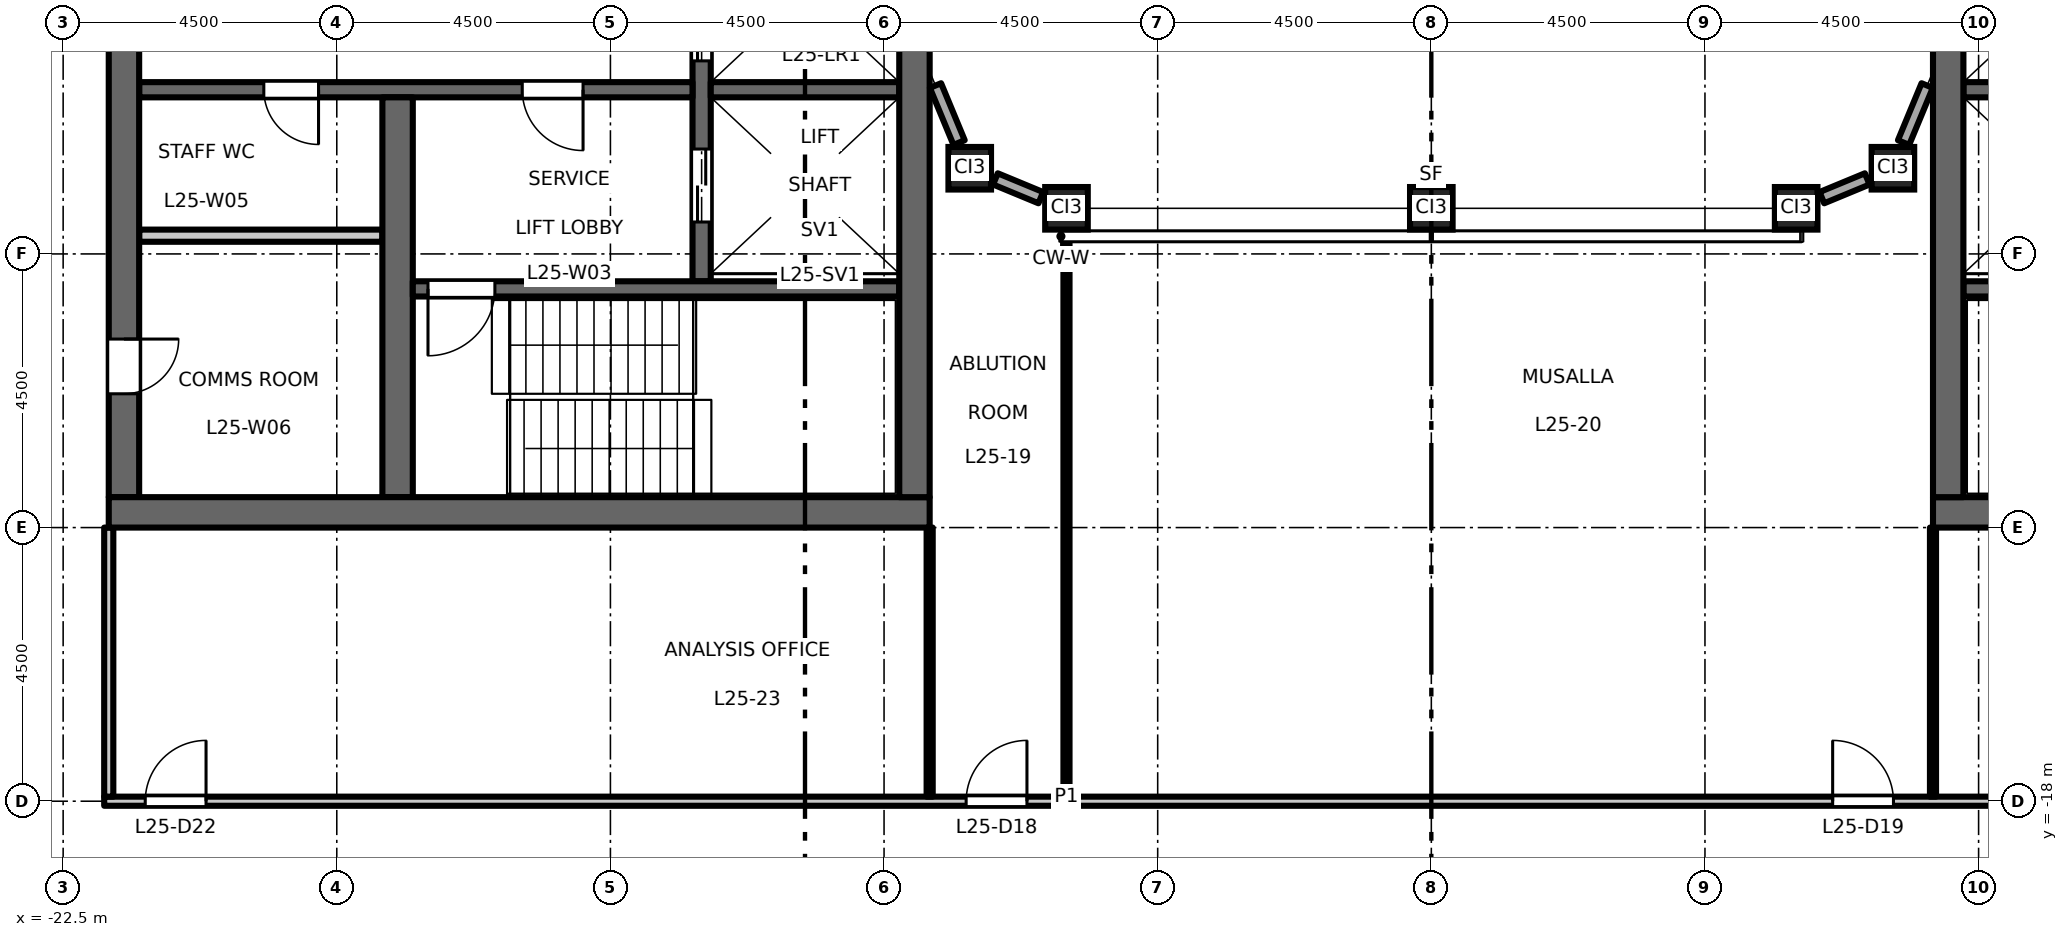
"""IFC4 building model, lengths in metres.
Left out: names, types, materials, properties, quantities, classifications, styles, units other than length and angle.
Written with IfcOpenShell. Run it as: python <this file> out.ifc"""

import sys

from ifc_helpers import new_model, si_unit, direction, frame, frame_2d, origin, origin_2d, place, context, subcontext, project, spatial, rectangle, hollow_rectangle, extrude, element, fill, save


model = new_model("IFC4")
c1 = context("Model", 3, precision=1e-05, world=origin(), true_north=direction((0.0, 1.0)))
c2 = subcontext(c1, "Body", "Model", "MODEL_VIEW")
j1 = project(units=[si_unit("LENGTHUNIT", "METRE"), si_unit("PLANEANGLEUNIT", "RADIAN")], contexts=[c1])
p1 = place(None, origin())
s1 = spatial("IfcSite", under=j1, at=p1, CompositionType="ELEMENT")
p2 = place(p1, origin())
s2 = spatial("IfcBuilding", under=s1, at=p2, CompositionType="ELEMENT")
p3 = place(p2, frame((0.0, 0.0, 118.2)))
s3 = spatial("IfcBuildingStorey", under=s2, at=p3, CompositionType="ELEMENT", Elevation=118.2)
for number, where, z_axis, x_axis in (
    (1, (-7.591, -7.591, 0.0), (0.0, 0.0, 1.0), (1.0, 0.0, 0.0)),
    (2, (-6.0, -8.25, 0.0), (0.0, 0.0, 1.0), (1.0, 0.0, 0.0)),
    (3, (0.0, -8.25, 0.0), (0.0, 0.0, 1.0), (1.0, 0.0, 0.0)),
    (4, (6.0, -8.25, 0.0), (0.0, 0.0, 1.0), (1.0, 0.0, 0.0)),
    (5, (7.591, -7.591, 0.0), (0.0, 0.0, 1.0), (1.0, 0.0, 0.0)),
):
    element("IfcColumn", number, at=place(p3, frame(where, z_axis=z_axis, x_axis=x_axis)), inside=s3, PredefinedType="COLUMN", context=c2, shape_type="SweptSolid", body=[
        extrude(hollow_rectangle(XDim=0.7, YDim=0.7, WallThickness=0.04, at=origin_2d()), origin(), (0.0, 0.0, 1.0), 4.5),
    ])
p4 = place(p3, frame((-12.0, -9.45, 0.0), z_axis=(0.0, 0.0, 1.0), x_axis=(0.0, 1.0, 0.0)))
e6 = element("IfcWall", 6, at=p4, inside=s3, PredefinedType="SHEAR", context=c2, shape_type="SweptSolid", body=[
    extrude(rectangle(XDim=18.9, YDim=0.3, at=frame_2d((9.45, 0.0))), origin(), (0.0, 0.0, 1.0), 4.35),
])
p5 = place(p4, frame((3.625, 0.0, 0.0)))
e7 = element("IfcOpeningElement", 7, at=p5, cuts=e6, PredefinedType="OPENING", context=c2, shape_type="SweptSolid", body=[
    extrude(rectangle(XDim=1.1, YDim=2.1, at=frame_2d((0.55, 1.05))), frame((0.0, 0.16, 0.0), z_axis=(0.0, -1.0, 0.0), x_axis=(1.0, 0.0, 0.0)), (0.0, 0.0, 1.0), 0.32),
])
p6 = place(p4, frame((6.775, 0.0, 0.0)))
e8 = element("IfcOpeningElement", 8, at=p6, cuts=e6, PredefinedType="OPENING", context=c2, shape_type="SweptSolid", body=[
    extrude(rectangle(XDim=1.1, YDim=2.1, at=frame_2d((0.55, 1.05))), frame((0.0, 0.16, 0.0), z_axis=(0.0, -1.0, 0.0), x_axis=(1.0, 0.0, 0.0)), (0.0, 0.0, 1.0), 0.32),
])
p7 = place(p4, frame((9.925, 0.0, 0.0)))
e9 = element("IfcOpeningElement", 9, at=p7, cuts=e6, PredefinedType="OPENING", context=c2, shape_type="SweptSolid", body=[
    extrude(rectangle(XDim=1.1, YDim=2.1, at=frame_2d((0.55, 1.05))), frame((0.0, 0.16, 0.0), z_axis=(0.0, -1.0, 0.0), x_axis=(1.0, 0.0, 0.0)), (0.0, 0.0, 1.0), 0.32),
])
p8 = place(p4, frame((13.075, 0.0, 0.0)))
e10 = element("IfcOpeningElement", 10, at=p8, cuts=e6, PredefinedType="OPENING", context=c2, shape_type="SweptSolid", body=[
    extrude(rectangle(XDim=1.1, YDim=2.1, at=frame_2d((0.55, 1.05))), frame((0.0, 0.16, 0.0), z_axis=(0.0, -1.0, 0.0), x_axis=(1.0, 0.0, 0.0)), (0.0, 0.0, 1.0), 0.32),
])
p9 = place(p4, frame((16.725, 0.0, 0.0)))
e11 = element("IfcOpeningElement", 11, at=p9, cuts=e6, PredefinedType="OPENING", context=c2, shape_type="SweptSolid", body=[
    extrude(rectangle(XDim=1.2, YDim=2.1, at=frame_2d((0.6, 1.05))), frame((0.0, 0.16, 0.0), z_axis=(0.0, -1.0, 0.0), x_axis=(1.0, 0.0, 0.0)), (0.0, 0.0, 1.0), 0.32),
])
p10 = place(p4, frame((0.975, 0.0, 0.0)))
e12 = element("IfcOpeningElement", 12, at=p10, cuts=e6, PredefinedType="OPENING", context=c2, shape_type="SweptSolid", body=[
    extrude(rectangle(XDim=1.2, YDim=2.1, at=frame_2d((0.6, 1.05))), frame((0.0, 0.16, 0.0), z_axis=(0.0, -1.0, 0.0), x_axis=(1.0, 0.0, 0.0)), (0.0, 0.0, 1.0), 0.32),
])
p11 = place(p3, frame((-12.15, -6.3, 0.0), z_axis=(0.0, 0.0, 1.0), x_axis=(-1.0, 0.0, 0.0)))
e13 = element("IfcWall", 13, at=p11, inside=s3, PredefinedType="SHEAR", context=c2, shape_type="SweptSolid", body=[
    extrude(rectangle(XDim=9.1, YDim=0.25, at=frame_2d((4.55, 0.0))), origin(), (0.0, 0.0, 1.0), 4.35),
])
p12 = place(p11, frame((1.8, 0.0, 0.0)))
e14 = element("IfcOpeningElement", 14, at=p12, cuts=e13, PredefinedType="OPENING", context=c2, shape_type="SweptSolid", body=[
    extrude(rectangle(XDim=1.0, YDim=2.1, at=frame_2d((0.5, 1.05))), frame((0.0, 0.135, 0.0), z_axis=(0.0, -1.0, 0.0), x_axis=(1.0, 0.0, 0.0)), (0.0, 0.0, 1.0), 0.27),
])
p13 = place(p11, frame((6.15, 0.0, 0.0)))
e15 = element("IfcOpeningElement", 15, at=p13, cuts=e13, PredefinedType="OPENING", context=c2, shape_type="SweptSolid", body=[
    extrude(rectangle(XDim=0.9, YDim=2.1, at=frame_2d((0.45, 1.05))), frame((0.0, 0.135, 0.0), z_axis=(0.0, -1.0, 0.0), x_axis=(1.0, 0.0, 0.0)), (0.0, 0.0, 1.0), 0.27),
])
p14 = place(p3, frame((-21.5, -13.0, 0.0), z_axis=(0.0, 0.0, 1.0), x_axis=(0.0, 1.0, 0.0)))
e16 = element("IfcWall", 16, at=p14, inside=s3, PredefinedType="SHEAR", context=c2, shape_type="SweptSolid", body=[
    extrude(rectangle(XDim=26.0, YDim=0.5, at=frame_2d((13.0, 0.0))), origin(), (0.0, 0.0, 1.0), 4.35),
])
p15 = place(p14, frame((16.825, 0.0, 0.0)))
e17 = element("IfcOpeningElement", 17, at=p15, cuts=e16, PredefinedType="OPENING", context=c2, shape_type="SweptSolid", body=[
    extrude(rectangle(XDim=1.8, YDim=2.1, at=frame_2d((0.9, 1.05))), frame((0.0, 0.26, 0.0), z_axis=(0.0, -1.0, 0.0), x_axis=(1.0, 0.0, 0.0)), (0.0, 0.0, 1.0), 0.52),
])
p16 = place(p14, frame((7.375, 0.0, 0.0)))
e18 = element("IfcOpeningElement", 18, at=p16, cuts=e16, PredefinedType="OPENING", context=c2, shape_type="SweptSolid", body=[
    extrude(rectangle(XDim=1.8, YDim=2.1, at=frame_2d((0.9, 1.05))), frame((0.0, 0.26, 0.0), z_axis=(0.0, -1.0, 0.0), x_axis=(1.0, 0.0, 0.0)), (0.0, 0.0, 1.0), 0.52),
])
p17 = place(p14, frame((22.45, 0.0, 0.0)))
e19 = element("IfcOpeningElement", 19, at=p17, cuts=e16, PredefinedType="OPENING", context=c2, shape_type="SweptSolid", body=[
    extrude(rectangle(XDim=0.9, YDim=2.1, at=frame_2d((0.45, 1.05))), frame((0.0, 0.26, 0.0), z_axis=(0.0, -1.0, 0.0), x_axis=(1.0, 0.0, 0.0)), (0.0, 0.0, 1.0), 0.52),
])
p18 = place(p14, frame((1.7, 0.0, 0.0)))
e20 = element("IfcOpeningElement", 20, at=p18, cuts=e16, PredefinedType="OPENING", context=c2, shape_type="SweptSolid", body=[
    extrude(rectangle(XDim=0.9, YDim=2.1, at=frame_2d((0.45, 1.05))), frame((0.0, 0.26, 0.0), z_axis=(0.0, -1.0, 0.0), x_axis=(1.0, 0.0, 0.0)), (0.0, 0.0, 1.0), 0.52),
])
p19 = place(p3, frame((-17.25, -8.7, 0.0), z_axis=(0.0, 0.0, 1.0), x_axis=(-1.0, 0.0, 0.0)))
e21 = element("IfcWall", 21, at=p19, inside=s3, PredefinedType="PARTITIONING", context=c2, shape_type="SweptSolid", body=[
    extrude(rectangle(XDim=4.0, YDim=0.2, at=frame_2d((2.0, 0.0))), origin(), (0.0, 0.0, 1.0), 4.35),
])
p20 = place(p3, frame((-17.0, -13.0, 0.0), z_axis=(0.0, 0.0, 1.0), x_axis=(0.0, 1.0, 0.0)))
e22 = element("IfcWall", 22, at=p20, inside=s3, PredefinedType="SHEAR", context=c2, shape_type="SweptSolid", body=[
    extrude(rectangle(XDim=6.575, YDim=0.5, at=frame_2d((3.288, 0.0))), origin(), (0.0, 0.0, 1.0), 4.35),
])
p21 = place(p3, frame((-8.75, -6.3, 0.0), z_axis=(0.0, 0.0, 1.0), x_axis=(-1.0, 0.0, 0.0)))
e23 = element("IfcWall", 23, at=p21, inside=s3, PredefinedType="SHEAR", context=c2, shape_type="SweptSolid", body=[
    extrude(rectangle(XDim=3.1, YDim=0.25, at=frame_2d((1.55, 0.0))), origin(), (0.0, 0.0, 1.0), 4.35),
])
p22 = place(p3, frame((-8.75, -9.575, 0.0), z_axis=(0.0, 0.0, 1.0), x_axis=(-1.0, 0.0, 0.0)))
e24 = element("IfcWall", 24, at=p22, inside=s3, PredefinedType="SHEAR", context=c2, shape_type="SweptSolid", body=[
    extrude(rectangle(XDim=8.0, YDim=0.25, at=frame_2d((4.0, 0.0))), origin(), (0.0, 0.0, 1.0), 4.35),
])
p23 = place(p22, frame((6.65, 0.0, 0.0)))
e25 = element("IfcOpeningElement", 25, at=p23, cuts=e24, PredefinedType="OPENING", context=c2, shape_type="SweptSolid", body=[
    extrude(rectangle(XDim=1.1, YDim=2.1, at=frame_2d((0.55, 1.05))), frame((0.0, 0.135, 0.0), z_axis=(0.0, -1.0, 0.0), x_axis=(1.0, 0.0, 0.0)), (0.0, 0.0, 1.0), 0.27),
])
p24 = place(p3, frame((-8.25, -13.25, 0.0), z_axis=(0.0, 0.0, 1.0), x_axis=(-1.0, 0.0, 0.0)))
e26 = element("IfcWall", 26, at=p24, inside=s3, PredefinedType="SHEAR", context=c2, shape_type="SweptSolid", body=[
    extrude(rectangle(XDim=13.5, YDim=0.5, at=frame_2d((6.75, 0.0))), origin(), (0.0, 0.0, 1.0), 4.35),
])
p25 = place(p3, frame((-8.5, -13.0, 0.0), z_axis=(0.0, 0.0, 1.0), x_axis=(0.0, 1.0, 0.0)))
e27 = element("IfcWall", 27, at=p25, inside=s3, PredefinedType="SHEAR", context=c2, shape_type="SweptSolid", body=[
    extrude(rectangle(XDim=26.0, YDim=0.5, at=frame_2d((13.0, 0.0))), origin(), (0.0, 0.0, 1.0), 4.35),
])
p26 = place(p3, frame((8.75, -6.3, 0.0), z_axis=(0.0, 0.0, 1.0), x_axis=(1.0, 0.0, 0.0)))
e28 = element("IfcWall", 28, at=p26, inside=s3, PredefinedType="SHEAR", context=c2, shape_type="SweptSolid", body=[
    extrude(rectangle(XDim=3.1, YDim=0.25, at=frame_2d((1.55, 0.0))), origin(), (0.0, 0.0, 1.0), 4.35),
])
p27 = place(p3, frame((8.75, -9.575, 0.0), z_axis=(0.0, 0.0, 1.0), x_axis=(1.0, 0.0, 0.0)))
e29 = element("IfcWall", 29, at=p27, inside=s3, PredefinedType="SHEAR", context=c2, shape_type="SweptSolid", body=[
    extrude(rectangle(XDim=8.0, YDim=0.25, at=frame_2d((4.0, 0.0))), origin(), (0.0, 0.0, 1.0), 4.35),
])
p28 = place(p27, frame((6.65, 0.0, 0.0)))
e30 = element("IfcOpeningElement", 30, at=p28, cuts=e29, PredefinedType="OPENING", context=c2, shape_type="SweptSolid", body=[
    extrude(rectangle(XDim=1.1, YDim=2.1, at=frame_2d((0.55, 1.05))), frame((0.0, 0.135, 0.0), z_axis=(0.0, -1.0, 0.0), x_axis=(1.0, 0.0, 0.0)), (0.0, 0.0, 1.0), 0.27),
])
p29 = place(p3, frame((8.25, -13.25, 0.0), z_axis=(0.0, 0.0, 1.0), x_axis=(1.0, 0.0, 0.0)))
e31 = element("IfcWall", 31, at=p29, inside=s3, PredefinedType="SHEAR", context=c2, shape_type="SweptSolid", body=[
    extrude(rectangle(XDim=13.5, YDim=0.5, at=frame_2d((6.75, 0.0))), origin(), (0.0, 0.0, 1.0), 4.35),
])
p30 = place(p3, frame((8.5, -13.0, 0.0), z_axis=(0.0, 0.0, 1.0), x_axis=(0.0, 1.0, 0.0)))
e32 = element("IfcWall", 32, at=p30, inside=s3, PredefinedType="SHEAR", context=c2, shape_type="SweptSolid", body=[
    extrude(rectangle(XDim=26.0, YDim=0.5, at=frame_2d((13.0, 0.0))), origin(), (0.0, 0.0, 1.0), 4.35),
])
p31 = place(p3, frame((6.423, -8.075, 0.0), z_axis=(0.0, 0.0, 1.0), x_axis=(0.923817771127, 0.382832503518, 0.0)))
e33 = element("IfcWall", 33, at=p31, inside=s3, PredefinedType="STANDARD", context=c2, shape_type="SweptSolid", body=[
    extrude(rectangle(XDim=0.807, YDim=0.2, at=frame_2d((0.404, 0.0))), origin(), (0.0, 0.0, 1.0), 3.826),
])
for number, where, z_axis, x_axis in (
    (34, (7.766, -7.168, 0.0), (0.0, 0.0, 1.0), (0.383, 0.924, 0.0)),
    (35, (-8.154, -6.231, 0.0), (0.0, 0.0, 1.0), (0.383, -0.924, 0.0)),
):
    element("IfcWall", number, at=place(p3, frame(where, z_axis=z_axis, x_axis=x_axis)), inside=s3, PredefinedType="STANDARD", context=c2, shape_type="SweptSolid", body=[
        extrude(rectangle(XDim=1.015, YDim=0.2, at=frame_2d((0.507, 0.0))), origin(), (0.0, 0.0, 1.0), 3.826),
    ])
p32 = place(p3, frame((-7.168, -7.766, 0.0), z_axis=(0.0, 0.0, 1.0), x_axis=(0.923817771127, -0.382832503518, 0.0)))
e36 = element("IfcWall", 36, at=p32, inside=s3, PredefinedType="STANDARD", context=c2, shape_type="SweptSolid", body=[
    extrude(rectangle(XDim=0.807, YDim=0.2, at=frame_2d((0.404, 0.0))), origin(), (0.0, 0.0, 1.0), 3.826),
])
p33 = place(p3, frame((-21.825, -18.0, 0.0), z_axis=(0.0, 0.0, 1.0), x_axis=(1.0, 0.0, 0.0)))
e37 = element("IfcWall", 37, at=p33, inside=s3, PredefinedType="PARTITIONING", context=c2, shape_type="SweptSolid", body=[
    extrude(rectangle(XDim=43.65, YDim=0.15, at=frame_2d((21.825, 0.0))), origin(), (0.0, 0.0, 1.0), 4.35),
])
p34 = place(p33, frame((14.175, 0.0, 0.0)))
e38 = element("IfcOpeningElement", 38, at=p34, cuts=e37, PredefinedType="OPENING", context=c2, shape_type="SweptSolid", body=[
    extrude(rectangle(XDim=1.0, YDim=2.1, at=frame_2d((0.5, 1.05))), frame((0.0, 0.085, 0.0), z_axis=(0.0, -1.0, 0.0), x_axis=(1.0, 0.0, 0.0)), (0.0, 0.0, 1.0), 0.17),
])
p35 = place(p33, frame((28.425, 0.0, 0.0)))
e39 = element("IfcOpeningElement", 39, at=p35, cuts=e37, PredefinedType="OPENING", context=c2, shape_type="SweptSolid", body=[
    extrude(rectangle(XDim=1.0, YDim=2.1, at=frame_2d((0.5, 1.05))), frame((0.0, 0.085, 0.0), z_axis=(0.0, -1.0, 0.0), x_axis=(1.0, 0.0, 0.0)), (0.0, 0.0, 1.0), 0.17),
])
p36 = place(p33, frame((0.675, 0.0, 0.0)))
e40 = element("IfcOpeningElement", 40, at=p36, cuts=e37, PredefinedType="OPENING", context=c2, shape_type="SweptSolid", body=[
    extrude(rectangle(XDim=1.0, YDim=2.1, at=frame_2d((0.5, 1.05))), frame((0.0, 0.085, 0.0), z_axis=(0.0, -1.0, 0.0), x_axis=(1.0, 0.0, 0.0)), (0.0, 0.0, 1.0), 0.17),
])
p37 = place(p33, frame((41.925, 0.0, 0.0)))
e41 = element("IfcOpeningElement", 41, at=p37, cuts=e37, PredefinedType="OPENING", context=c2, shape_type="SweptSolid", body=[
    extrude(rectangle(XDim=1.0, YDim=2.1, at=frame_2d((0.5, 1.05))), frame((0.0, 0.085, 0.0), z_axis=(0.0, -1.0, 0.0), x_axis=(1.0, 0.0, 0.0)), (0.0, 0.0, 1.0), 0.17),
])
p38 = place(p3, frame((-21.75, -17.925, 0.0), z_axis=(0.0, 0.0, 1.0), x_axis=(0.0, 1.0, 0.0)))
e42 = element("IfcWall", 42, at=p38, inside=s3, PredefinedType="PARTITIONING", context=c2, shape_type="SweptSolid", body=[
    extrude(rectangle(XDim=4.425, YDim=0.15, at=frame_2d((2.212, 0.0))), origin(), (0.0, 0.0, 1.0), 4.35),
])
p39 = place(p3, frame((-8.25, -17.925, 0.0), z_axis=(0.0, 0.0, 1.0), x_axis=(0.0, 1.0, 0.0)))
e43 = element("IfcWall", 43, at=p39, inside=s3, PredefinedType="PARTITIONING", context=c2, shape_type="SweptSolid", body=[
    extrude(rectangle(XDim=4.425, YDim=0.1, at=frame_2d((2.212, 0.0))), origin(), (0.0, 0.0, 1.0), 4.35),
])
p40 = place(p3, frame((-6.0, -17.925, 0.0), z_axis=(0.0, 0.0, 1.0), x_axis=(0.0, 1.0, 0.0)))
e44 = element("IfcWall", 44, at=p40, inside=s3, PredefinedType="PARTITIONING", context=c2, shape_type="SweptSolid", body=[
    extrude(rectangle(XDim=9.275, YDim=0.1, at=frame_2d((4.638, 0.0))), origin(), (0.0, 0.0, 1.0), 4.35),
])
p41 = place(p3, frame((8.25, -17.925, 0.0), z_axis=(0.0, 0.0, 1.0), x_axis=(0.0, 1.0, 0.0)))
e45 = element("IfcWall", 45, at=p41, inside=s3, PredefinedType="PARTITIONING", context=c2, shape_type="SweptSolid", body=[
    extrude(rectangle(XDim=4.425, YDim=0.1, at=frame_2d((2.212, 0.0))), origin(), (0.0, 0.0, 1.0), 4.35),
])
p42 = place(p12, origin())
e46 = element("IfcDoor", 46, at=p42, inside=s3, OperationType="SINGLE_SWING_RIGHT", PredefinedType="DOOR", context=c2, shape_type="SweptSolid", body=[
    extrude(rectangle(XDim=1.0, YDim=2.1, at=frame_2d((0.5, 1.05))), frame((0.0, 0.025, 0.0), z_axis=(0.0, -1.0, 0.0), x_axis=(1.0, 0.0, 0.0)), (0.0, 0.0, 1.0), 0.05),
])
fill(e14, e46)
p43 = place(p23, origin())
e47 = element("IfcDoor", 47, at=p43, inside=s3, OperationType="SINGLE_SWING_LEFT", PredefinedType="DOOR", context=c2, shape_type="SweptSolid", body=[
    extrude(rectangle(XDim=1.1, YDim=2.1, at=frame_2d((0.55, 1.05))), frame((0.0, 0.025, 0.0), z_axis=(0.0, -1.0, 0.0), x_axis=(1.0, 0.0, 0.0)), (0.0, 0.0, 1.0), 0.05),
])
fill(e25, e47)
p44 = place(p5, origin())
e48 = element("IfcDoor", 48, at=p44, inside=s3, OperationType="DOUBLE_DOOR_SLIDING", PredefinedType="DOOR", context=c2, shape_type="SweptSolid", body=[
    extrude(rectangle(XDim=1.1, YDim=2.1, at=frame_2d((0.55, 1.05))), frame((0.0, 0.025, 0.0), z_axis=(0.0, -1.0, 0.0), x_axis=(1.0, 0.0, 0.0)), (0.0, 0.0, 1.0), 0.05),
])
fill(e7, e48)
p45 = place(p10, origin())
e49 = element("IfcDoor", 49, at=p45, inside=s3, OperationType="DOUBLE_DOOR_SLIDING", PredefinedType="DOOR", context=c2, shape_type="SweptSolid", body=[
    extrude(rectangle(XDim=1.2, YDim=2.1, at=frame_2d((0.6, 1.05))), frame((0.0, 0.025, 0.0), z_axis=(0.0, -1.0, 0.0), x_axis=(1.0, 0.0, 0.0)), (0.0, 0.0, 1.0), 0.05),
])
fill(e12, e49)
p46 = place(p13, origin())
e50 = element("IfcDoor", 50, at=p46, inside=s3, OperationType="SINGLE_SWING_RIGHT", PredefinedType="DOOR", context=c2, shape_type="SweptSolid", body=[
    extrude(rectangle(XDim=0.9, YDim=2.1, at=frame_2d((0.45, 1.05))), frame((0.0, 0.025, 0.0), z_axis=(0.0, -1.0, 0.0), x_axis=(1.0, 0.0, 0.0)), (0.0, 0.0, 1.0), 0.05),
])
fill(e15, e50)
p47 = place(p18, origin())
e51 = element("IfcDoor", 51, at=p47, inside=s3, OperationType="SINGLE_SWING_RIGHT", PredefinedType="DOOR", context=c2, shape_type="SweptSolid", body=[
    extrude(rectangle(XDim=0.9, YDim=2.1, at=frame_2d((0.45, 1.05))), frame((0.0, 0.025, 0.0), z_axis=(0.0, -1.0, 0.0), x_axis=(1.0, 0.0, 0.0)), (0.0, 0.0, 1.0), 0.05),
])
fill(e20, e51)
p48 = place(p34, origin())
e52 = element("IfcDoor", 52, at=p48, inside=s3, OperationType="SINGLE_SWING_RIGHT", PredefinedType="DOOR", context=c2, shape_type="SweptSolid", body=[
    extrude(rectangle(XDim=1.0, YDim=2.1, at=frame_2d((0.5, 1.05))), frame((0.0, 0.025, 0.0), z_axis=(0.0, -1.0, 0.0), x_axis=(1.0, 0.0, 0.0)), (0.0, 0.0, 1.0), 0.05),
])
fill(e38, e52)
p49 = place(p35, origin())
e53 = element("IfcDoor", 53, at=p49, inside=s3, OperationType="SINGLE_SWING_LEFT", PredefinedType="DOOR", context=c2, shape_type="SweptSolid", body=[
    extrude(rectangle(XDim=1.0, YDim=2.1, at=frame_2d((0.5, 1.05))), frame((0.0, 0.025, 0.0), z_axis=(0.0, -1.0, 0.0), x_axis=(1.0, 0.0, 0.0)), (0.0, 0.0, 1.0), 0.05),
])
fill(e39, e53)
p50 = place(p36, origin())
e54 = element("IfcDoor", 54, at=p50, inside=s3, OperationType="SINGLE_SWING_RIGHT", PredefinedType="DOOR", context=c2, shape_type="SweptSolid", body=[
    extrude(rectangle(XDim=1.0, YDim=2.1, at=frame_2d((0.5, 1.05))), frame((0.0, 0.025, 0.0), z_axis=(0.0, -1.0, 0.0), x_axis=(1.0, 0.0, 0.0)), (0.0, 0.0, 1.0), 0.05),
])
fill(e40, e54)
save(model, sys.argv[1])
